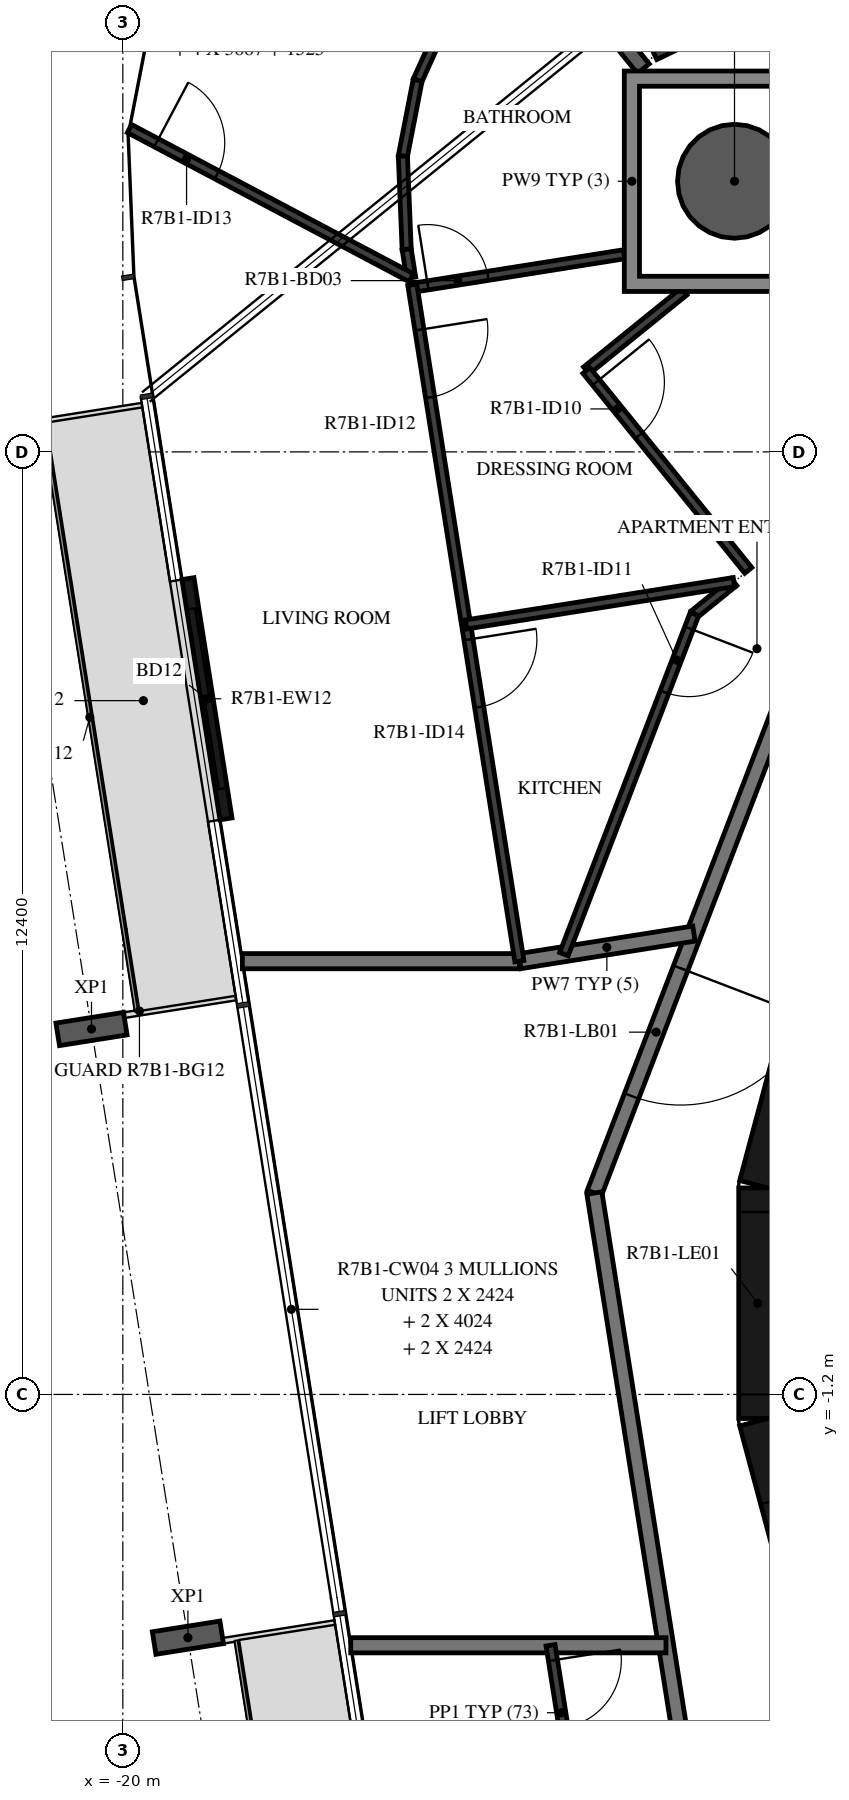
"""IFC4 building model, lengths in metres.
Left out: names, types, materials, properties, quantities, classifications, styles, units other than length and angle.
Written with IfcOpenShell. Run it as: python <this file> out.ifc"""

import sys

from ifc_helpers import new_model, si_unit, direction, frame, frame_2d, origin, origin_2d, place, context, subcontext, project, spatial, polyline, rectangle, hollow_circle, i_section, outline, extrude, element, fill, save


model = new_model("IFC4")
c1 = context("Model", 3, precision=1e-05, world=origin(), true_north=direction((0.0, 1.0)))
c2 = subcontext(c1, "Body", "Model", "MODEL_VIEW")
j1 = project(units=[si_unit("LENGTHUNIT", "METRE"), si_unit("PLANEANGLEUNIT", "RADIAN")], contexts=[c1])
p1 = place(None, origin())
s1 = spatial("IfcSite", under=j1, at=p1, CompositionType="ELEMENT")
p2 = place(p1, origin())
s2 = spatial("IfcBuilding", under=s1, at=p2, CompositionType="ELEMENT")
p3 = place(p2, frame((0.0, 0.0, 273.9)))
s3 = spatial("IfcBuildingStorey", under=s2, at=p3, CompositionType="ELEMENT", Elevation=273.9)
p4 = place(p3, frame((-11.953, 14.76, -0.38), z_axis=(0.0, 0.0, 1.0), x_axis=(1.0, 0.0, 0.0)))
e1 = element("IfcColumn", 1, at=p4, inside=s3, PredefinedType="COLUMN", context=c2, shape_type="SweptSolid", body=[
    extrude(hollow_circle(Radius=0.75, WallThickness=0.035, at=origin_2d()), origin(), (0.0, 0.0, 1.0), 3.5),
])
for number, where, z_axis, x_axis in (
    (2, (-20.412, 3.608, -0.38), (0.0, 0.0, 1.0), (-0.156, 0.988, 0.0)),
    (3, (-19.144, -4.4, -0.38), (0.0, 0.0, 1.0), (-0.156, 0.988, 0.0)),
):
    element("IfcColumn", number, at=place(p3, frame(where, z_axis=z_axis, x_axis=x_axis)), inside=s3, PredefinedType="COLUMN", context=c2, shape_type="SweptSolid", body=[
        extrude(i_section(OverallWidth=0.3, OverallDepth=0.9, WebThickness=0.019, FlangeThickness=0.035, FilletRadius=0.03, at=origin_2d()), origin(), (0.0, 0.0, 1.0), 3.5),
    ])
p5 = place(p3, frame((-19.144, 9.533, 0.0), z_axis=(0.0, 0.0, 1.0), x_axis=(0.156401347891, -0.987693585267, 0.0)))
e4 = element("IfcWall", 4, at=p5, inside=s3, PredefinedType="STANDARD", context=c2, shape_type="SweptSolid", body=[
    extrude(rectangle(XDim=3.2, YDim=0.16, at=frame_2d((1.6, 0.0))), origin(), (0.0, 0.0, 1.0), 3.12),
])
p6 = place(p5, frame((0.4, 0.0, 0.0)))
e5 = element("IfcOpeningElement", 5, at=p6, cuts=e4, PredefinedType="OPENING", context=c2, shape_type="SweptSolid", body=[
    extrude(rectangle(XDim=2.4, YDim=2.4, at=frame_2d((1.2, 1.2))), frame((0.0, 0.09, 0.0), z_axis=(0.0, -1.0, 0.0), x_axis=(1.0, 0.0, 0.0)), (0.0, 0.0, 1.0), 0.18),
])
p7 = place(p3, frame((-10.858, 4.479, 0.0), z_axis=(0.0, 0.0, 1.0), x_axis=(-0.258734743916, -0.965948410781, 0.0)))
e6 = element("IfcWall", 6, at=p7, inside=s3, PredefinedType="SHEAR", context=c2, shape_type="SweptSolid", body=[
    extrude(rectangle(XDim=3.033, YDim=0.5, at=frame_2d((1.516, 0.0))), origin(), (0.0, 0.0, 1.0), 3.12),
])
p8 = place(p3, frame((-11.647, 1.516, 0.0), z_axis=(0.0, 0.0, 1.0), x_axis=(0.0, -1.0, 0.0)))
e7 = element("IfcWall", 7, at=p8, inside=s3, PredefinedType="SHEAR", context=c2, shape_type="SweptSolid", body=[
    extrude(rectangle(XDim=3.033, YDim=0.5, at=frame_2d((1.516, 0.0))), origin(), (0.0, 0.0, 1.0), 3.12),
])
p9 = place(p8, frame((0.316, 0.0, 0.0)))
e8 = element("IfcOpeningElement", 8, at=p9, cuts=e7, PredefinedType="OPENING", context=c2, shape_type="SweptSolid", body=[
    extrude(rectangle(XDim=2.4, YDim=2.1, at=frame_2d((1.2, 1.05))), frame((0.0, 0.26, 0.0), z_axis=(0.0, -1.0, 0.0), x_axis=(1.0, 0.0, 0.0)), (0.0, 0.0, 1.0), 0.52),
])
p10 = place(p3, frame((-11.643, -1.55, 0.0), z_axis=(0.0, 0.0, 1.0), x_axis=(0.258734743916, -0.965948410781, 0.0)))
e9 = element("IfcWall", 9, at=p10, inside=s3, PredefinedType="SHEAR", context=c2, shape_type="SweptSolid", body=[
    extrude(rectangle(XDim=3.033, YDim=0.5, at=frame_2d((1.516, 0.0))), origin(), (0.0, 0.0, 1.0), 3.12),
])
p11 = place(p10, frame((1.066, 0.0, 0.0)))
e10 = element("IfcOpeningElement", 10, at=p11, cuts=e9, PredefinedType="OPENING", context=c2, shape_type="SweptSolid", body=[
    extrude(rectangle(XDim=0.9, YDim=2.1, at=frame_2d((0.45, 1.05))), frame((0.0, 0.26, 0.0), z_axis=(0.0, -1.0, 0.0), x_axis=(1.0, 0.0, 0.0)), (0.0, 0.0, 1.0), 0.52),
])
p12 = place(p3, frame((-11.223, 8.154, 0.0), z_axis=(0.0, 0.0, 1.0), x_axis=(-0.358341090983, -0.93359073609, 0.0)))
e11 = element("IfcWall", 11, at=p12, inside=s3, PredefinedType="STANDARD", context=c2, shape_type="SweptSolid", body=[
    extrude(rectangle(XDim=7.181, YDim=0.2, at=frame_2d((3.59, 0.0))), origin(), (0.0, 0.0, 1.0), 3.12),
])
p13 = place(p12, frame((4.014, 0.0, 0.0)))
e12 = element("IfcOpeningElement", 12, at=p13, cuts=e11, PredefinedType="OPENING", context=c2, shape_type="SweptSolid", body=[
    extrude(rectangle(XDim=1.8, YDim=2.1, at=frame_2d((0.9, 1.05))), frame((0.0, 0.11, 0.0), z_axis=(0.0, -1.0, 0.0), x_axis=(1.0, 0.0, 0.0)), (0.0, 0.0, 1.0), 0.22),
])
p14 = place(p3, frame((-13.797, 1.45, 0.0), z_axis=(0.0, 0.0, 1.0), x_axis=(0.156421704315, -0.987690361611, 0.0)))
e13 = element("IfcWall", 13, at=p14, inside=s3, PredefinedType="STANDARD", context=c2, shape_type="SweptSolid", body=[
    extrude(rectangle(XDim=7.181, YDim=0.2, at=frame_2d((3.591, 0.0))), origin(), (0.0, 0.0, 1.0), 3.12),
])
p15 = place(p3, frame((-12.487, 4.863, 0.0), z_axis=(0.0, 0.0, 1.0), x_axis=(-0.98769031179, -0.156422018898, 0.0)))
e14 = element("IfcWall", 14, at=p15, inside=s3, PredefinedType="STANDARD", context=c2, shape_type="SweptSolid", body=[
    extrude(rectangle(XDim=2.319, YDim=0.2, at=frame_2d((1.16, 0.0))), origin(), (0.0, 0.0, 1.0), 3.12),
])
p16 = place(p3, frame((-14.783, 4.5, 0.0), z_axis=(0.0, 0.0, 1.0), x_axis=(-1.0, 0.0, 0.0)))
e15 = element("IfcWall", 15, at=p16, inside=s3, PredefinedType="STANDARD", context=c2, shape_type="SweptSolid", body=[
    extrude(rectangle(XDim=3.645, YDim=0.2, at=frame_2d((1.822, 0.0))), origin(), (0.0, 0.0, 1.0), 3.12),
])
p17 = place(p3, frame((-17.002, -4.5, 0.0), z_axis=(0.0, 0.0, 1.0), x_axis=(1.0, 0.0, 0.0)))
e16 = element("IfcWall", 16, at=p17, inside=s3, PredefinedType="STANDARD", context=c2, shape_type="SweptSolid", body=[
    extrude(rectangle(XDim=4.148, YDim=0.2, at=frame_2d((2.074, 0.0))), origin(), (0.0, 0.0, 1.0), 3.12),
])
p18 = place(p3, frame((-16.953, 20.936, 0.0), z_axis=(0.0, 0.0, 1.0), x_axis=(0.629347053134, -0.77712437017, 0.0)))
e17 = element("IfcWall", 17, at=p18, inside=s3, PredefinedType="STANDARD", context=c2, shape_type="SweptSolid", body=[
    extrude(rectangle(XDim=6.04, YDim=0.2, at=frame_2d((3.02, 0.0))), origin(), (0.0, 0.0, 1.0), 3.12),
])
p19 = place(p3, frame((-14.132, 22.418, 0.0), z_axis=(0.0, 0.0, 1.0), x_axis=(0.629309172704, -0.77715504576, 0.0)))
e18 = element("IfcWall", 18, at=p19, inside=s3, PredefinedType="PARTITIONING", context=c2, shape_type="SweptSolid", body=[
    extrude(rectangle(XDim=8.736, YDim=0.12, at=frame_2d((4.368, 0.0))), origin(), (0.0, 0.0, 1.0), 3.12),
])
p20 = place(p19, frame((0.4, 0.0, 0.0)))
e19 = element("IfcOpeningElement", 19, at=p20, cuts=e18, PredefinedType="OPENING", context=c2, shape_type="SweptSolid", body=[
    extrude(rectangle(XDim=0.9, YDim=2.1, at=frame_2d((0.45, 1.05))), frame((0.0, 0.07, 0.0), z_axis=(0.0, -1.0, 0.0), x_axis=(1.0, 0.0, 0.0)), (0.0, 0.0, 1.0), 0.14),
])
p21 = place(p3, frame((-10.91, 16.502, 0.0), z_axis=(0.0, 0.0, 1.0), x_axis=(-0.96886520615, 0.247588796823, 0.0)))
e20 = element("IfcWall", 20, at=p21, inside=s3, PredefinedType="PARTITIONING", context=c2, shape_type="SweptSolid", body=[
    extrude(rectangle(XDim=0.807, YDim=0.12, at=frame_2d((0.403, 0.0))), origin(), (0.0, 0.0, 1.0), 3.12),
])
p22 = place(p3, frame((-12.591, 16.613, 0.0), z_axis=(0.0, 0.0, 1.0), x_axis=(-0.901405666701, -0.432975546699, 0.0)))
e21 = element("IfcWall", 21, at=p22, inside=s3, PredefinedType="PARTITIONING", context=c2, shape_type="SweptSolid", body=[
    extrude(rectangle(XDim=0.455, YDim=0.12, at=frame_2d((0.227, 0.0))), origin(), (0.0, 0.0, 1.0), 3.12),
])
p23 = place(p3, frame((-12.616, 13.311, 0.0), z_axis=(0.0, 0.0, 1.0), x_axis=(-0.7771657422, -0.629295963082, 0.0)))
e22 = element("IfcWall", 22, at=p23, inside=s3, PredefinedType="PARTITIONING", context=c2, shape_type="SweptSolid", body=[
    extrude(rectangle(XDim=1.653, YDim=0.12, at=frame_2d((0.826, 0.0))), origin(), (0.0, 0.0, 1.0), 3.12),
])
p24 = place(p3, frame((-13.901, 12.271, 0.0), z_axis=(0.0, 0.0, 1.0), x_axis=(0.62932066967, -0.777145735835, 0.0)))
e23 = element("IfcWall", 23, at=p24, inside=s3, PredefinedType="PARTITIONING", context=c2, shape_type="SweptSolid", body=[
    extrude(rectangle(XDim=3.384, YDim=0.12, at=frame_2d((1.692, 0.0))), origin(), (0.0, 0.0, 1.0), 3.12),
])
p25 = place(p24, frame((0.2, 0.0, 0.0)))
e24 = element("IfcOpeningElement", 24, at=p25, cuts=e23, PredefinedType="OPENING", context=c2, shape_type="SweptSolid", body=[
    extrude(rectangle(XDim=0.9, YDim=2.1, at=frame_2d((0.45, 1.05))), frame((0.0, 0.07, 0.0), z_axis=(0.0, -1.0, 0.0), x_axis=(1.0, 0.0, 0.0)), (0.0, 0.0, 1.0), 0.14),
])
p26 = place(p3, frame((-11.96, 9.487, 0.0), z_axis=(0.0, 0.0, 1.0), x_axis=(-0.777219341678, -0.62922976322, 0.0)))
e25 = element("IfcWall", 25, at=p26, inside=s3, PredefinedType="PARTITIONING", context=c2, shape_type="SweptSolid", body=[
    extrude(rectangle(XDim=0.668, YDim=0.12, at=frame_2d((0.334, 0.0))), origin(), (0.0, 0.0, 1.0), 3.12),
])
p27 = place(p3, frame((-12.479, 9.067, 0.0), z_axis=(0.0, 0.0, 1.0), x_axis=(-0.358402229057, -0.933567267104, 0.0)))
e26 = element("IfcWall", 26, at=p27, inside=s3, PredefinedType="PARTITIONING", context=c2, shape_type="SweptSolid", body=[
    extrude(rectangle(XDim=4.793, YDim=0.12, at=frame_2d((2.397, 0.0))), origin(), (0.0, 0.0, 1.0), 3.12),
])
p28 = place(p27, frame((0.2, 0.0, 0.0)))
e27 = element("IfcOpeningElement", 27, at=p28, cuts=e26, PredefinedType="OPENING", context=c2, shape_type="SweptSolid", body=[
    extrude(rectangle(XDim=0.9, YDim=2.1, at=frame_2d((0.45, 1.05))), frame((0.0, 0.07, 0.0), z_axis=(0.0, -1.0, 0.0), x_axis=(1.0, 0.0, 0.0)), (0.0, 0.0, 1.0), 0.14),
])
p29 = place(p3, frame((-15.703, 17.014, 0.0), z_axis=(0.0, 0.0, 1.0), x_axis=(-0.411973085874, -0.911196014322, 0.0)))
e28 = element("IfcWall", 28, at=p29, inside=s3, PredefinedType="PARTITIONING", context=c2, shape_type="SweptSolid", body=[
    extrude(rectangle(XDim=1.016, YDim=0.12, at=frame_2d((0.508, 0.0))), origin(), (0.0, 0.0, 1.0), 3.12),
])
p30 = place(p3, frame((-16.122, 16.088, 0.0), z_axis=(0.0, 0.0, 1.0), x_axis=(-0.191030445301, -0.981584112019, 0.0)))
e29 = element("IfcWall", 29, at=p30, inside=s3, PredefinedType="PARTITIONING", context=c2, shape_type="SweptSolid", body=[
    extrude(rectangle(XDim=1.016, YDim=0.12, at=frame_2d((0.508, 0.0))), origin(), (0.0, 0.0, 1.0), 3.12),
])
p31 = place(p3, frame((-16.316, 15.091, 0.0), z_axis=(0.0, 0.0, 1.0), x_axis=(0.040786423131, -0.999167887639, 0.0)))
e30 = element("IfcWall", 30, at=p31, inside=s3, PredefinedType="PARTITIONING", context=c2, shape_type="SweptSolid", body=[
    extrude(rectangle(XDim=1.227, YDim=0.12, at=frame_2d((0.614, 0.0))), origin(), (0.0, 0.0, 1.0), 3.12),
])
p32 = place(p3, frame((-16.266, 13.865, 0.0), z_axis=(0.0, 0.0, 1.0), x_axis=(0.156757556272, -0.987637113798, 0.0)))
e31 = element("IfcWall", 31, at=p32, inside=s3, PredefinedType="PARTITIONING", context=c2, shape_type="SweptSolid", body=[
    extrude(rectangle(XDim=0.378, YDim=0.12, at=frame_2d((0.189, 0.0))), origin(), (0.0, 0.0, 1.0), 3.12),
])
p33 = place(p3, frame((-16.186, 13.359, 0.0), z_axis=(0.0, 0.0, 1.0), x_axis=(0.987680631298, 0.156483131865, 0.0)))
e32 = element("IfcWall", 32, at=p33, inside=s3, PredefinedType="PARTITIONING", context=c2, shape_type="SweptSolid", body=[
    extrude(rectangle(XDim=2.818, YDim=0.12, at=frame_2d((1.409, 0.0))), origin(), (0.0, 0.0, 1.0), 3.12),
])
p34 = place(p33, frame((0.2, 0.0, 0.0)))
e33 = element("IfcOpeningElement", 33, at=p34, cuts=e32, PredefinedType="OPENING", context=c2, shape_type="SweptSolid", body=[
    extrude(rectangle(XDim=0.8, YDim=2.1, at=frame_2d((0.4, 1.05))), frame((0.0, 0.07, 0.0), z_axis=(0.0, -1.0, 0.0), x_axis=(1.0, 0.0, 0.0)), (0.0, 0.0, 1.0), 0.14),
])
p35 = place(p3, frame((-19.913, 15.454, 0.0), z_axis=(0.0, 0.0, 1.0), x_axis=(0.883751094582, -0.467957266024, 0.0)))
e34 = element("IfcWall", 34, at=p35, inside=s3, PredefinedType="PARTITIONING", context=c2, shape_type="SweptSolid", body=[
    extrude(rectangle(XDim=4.194, YDim=0.12, at=frame_2d((2.097, 0.0))), origin(), (0.0, 0.0, 1.0), 3.12),
])
p36 = place(p35, frame((0.4, 0.0, 0.0)))
e35 = element("IfcOpeningElement", 35, at=p36, cuts=e34, PredefinedType="OPENING", context=c2, shape_type="SweptSolid", body=[
    extrude(rectangle(XDim=0.9, YDim=2.1, at=frame_2d((0.45, 1.05))), frame((0.0, 0.07, 0.0), z_axis=(0.0, -1.0, 0.0), x_axis=(1.0, 0.0, 0.0)), (0.0, 0.0, 1.0), 0.14),
])
p37 = place(p3, frame((-16.192, 13.399, 0.0), z_axis=(0.0, 0.0, 1.0), x_axis=(0.156405047803, -0.987692999379, 0.0)))
e36 = element("IfcWall", 36, at=p37, inside=s3, PredefinedType="PARTITIONING", context=c2, shape_type="SweptSolid", body=[
    extrude(rectangle(XDim=9.01, YDim=0.12, at=frame_2d((4.505, 0.0))), origin(), (0.0, 0.0, 1.0), 3.12),
])
p38 = place(p37, frame((0.6, 0.0, 0.0)))
e37 = element("IfcOpeningElement", 37, at=p38, cuts=e36, PredefinedType="OPENING", context=c2, shape_type="SweptSolid", body=[
    extrude(rectangle(XDim=0.9, YDim=2.1, at=frame_2d((0.45, 1.05))), frame((0.0, 0.07, 0.0), z_axis=(0.0, -1.0, 0.0), x_axis=(1.0, 0.0, 0.0)), (0.0, 0.0, 1.0), 0.14),
])
p39 = place(p37, frame((4.725, 0.0, 0.0)))
e38 = element("IfcOpeningElement", 38, at=p39, cuts=e36, PredefinedType="OPENING", context=c2, shape_type="SweptSolid", body=[
    extrude(rectangle(XDim=0.9, YDim=2.1, at=frame_2d((0.45, 1.05))), frame((0.0, 0.07, 0.0), z_axis=(0.0, -1.0, 0.0), x_axis=(1.0, 0.0, 0.0)), (0.0, 0.0, 1.0), 0.14),
])
p40 = place(p3, frame((-15.484, 8.929, 0.0), z_axis=(0.0, 0.0, 1.0), x_axis=(0.987689619983, 0.156426387092, 0.0)))
e39 = element("IfcWall", 39, at=p40, inside=s3, PredefinedType="PARTITIONING", context=c2, shape_type="SweptSolid", body=[
    extrude(rectangle(XDim=3.568, YDim=0.12, at=frame_2d((1.784, 0.0))), origin(), (0.0, 0.0, 1.0), 3.12),
])
p41 = place(p3, frame((-14.373, -4.5, 0.0), z_axis=(0.0, 0.0, 1.0), x_axis=(0.156437152886, -0.987687914878, 0.0)))
e40 = element("IfcWall", 40, at=p41, inside=s3, PredefinedType="PARTITIONING", context=c2, shape_type="SweptSolid", body=[
    extrude(rectangle(XDim=1.796, YDim=0.12, at=frame_2d((0.898, 0.0))), origin(), (0.0, 0.0, 1.0), 3.12),
])
p42 = place(p41, frame((0.2, 0.0, 0.0)))
e41 = element("IfcOpeningElement", 41, at=p42, cuts=e40, PredefinedType="OPENING", context=c2, shape_type="SweptSolid", body=[
    extrude(rectangle(XDim=0.9, YDim=2.1, at=frame_2d((0.45, 1.05))), frame((0.0, 0.07, 0.0), z_axis=(0.0, -1.0, 0.0), x_axis=(1.0, 0.0, 0.0)), (0.0, 0.0, 1.0), 0.14),
])
p43 = place(p3, origin())
e42 = element("IfcWall", 42, at=p43, inside=s3, PredefinedType="STANDARD", context=c2, shape_type="SweptSolid", body=[
    extrude(outline(polyline([(-10.503, 16.21), (-10.503, 13.311), (-13.403, 13.311), (-13.403, 16.21), (-10.503, 16.21)]), holes=[polyline([(-13.203, 13.51), (-10.703, 13.51), (-10.703, 16.01), (-13.203, 16.01), (-13.203, 13.51)])]), origin(), (0.0, 0.0, 1.0), 3.12),
])
p44 = place(p6, origin())
e43 = element("IfcDoor", 43, at=p44, inside=s3, OperationType="DOUBLE_DOOR_SLIDING", PredefinedType="DOOR", context=c2, shape_type="SweptSolid", body=[
    extrude(rectangle(XDim=2.4, YDim=2.4, at=frame_2d((1.2, 1.2))), frame((0.0, 0.025, 0.0), z_axis=(0.0, -1.0, 0.0), x_axis=(1.0, 0.0, 0.0)), (0.0, 0.0, 1.0), 0.05),
])
fill(e5, e43)
p45 = place(p9, origin())
e44 = element("IfcDoor", 44, at=p45, inside=s3, OperationType="DOUBLE_DOOR_SINGLE_SWING", PredefinedType="DOOR", context=c2, shape_type="SweptSolid", body=[
    extrude(rectangle(XDim=2.4, YDim=2.1, at=frame_2d((1.2, 1.05))), frame((0.0, 0.025, 0.0), z_axis=(0.0, -1.0, 0.0), x_axis=(1.0, 0.0, 0.0)), (0.0, 0.0, 1.0), 0.05),
])
fill(e8, e44)
p46 = place(p25, origin())
e45 = element("IfcDoor", 45, at=p46, inside=s3, OperationType="SINGLE_SWING_LEFT", PredefinedType="DOOR", context=c2, shape_type="SweptSolid", body=[
    extrude(rectangle(XDim=0.9, YDim=2.1, at=frame_2d((0.45, 1.05))), frame((0.0, 0.025, 0.0), z_axis=(0.0, -1.0, 0.0), x_axis=(1.0, 0.0, 0.0)), (0.0, 0.0, 1.0), 0.05),
])
fill(e24, e45)
p47 = place(p28, origin())
e46 = element("IfcDoor", 46, at=p47, inside=s3, OperationType="SINGLE_SWING_LEFT", PredefinedType="DOOR", context=c2, shape_type="SweptSolid", body=[
    extrude(rectangle(XDim=0.9, YDim=2.1, at=frame_2d((0.45, 1.05))), frame((0.0, 0.025, 0.0), z_axis=(0.0, -1.0, 0.0), x_axis=(1.0, 0.0, 0.0)), (0.0, 0.0, 1.0), 0.05),
])
fill(e27, e46)
p48 = place(p34, origin())
e47 = element("IfcDoor", 47, at=p48, inside=s3, OperationType="SINGLE_SWING_LEFT", PredefinedType="DOOR", context=c2, shape_type="SweptSolid", body=[
    extrude(rectangle(XDim=0.8, YDim=2.1, at=frame_2d((0.4, 1.05))), frame((0.0, 0.025, 0.0), z_axis=(0.0, -1.0, 0.0), x_axis=(1.0, 0.0, 0.0)), (0.0, 0.0, 1.0), 0.05),
])
fill(e33, e47)
p49 = place(p38, origin())
e48 = element("IfcDoor", 48, at=p49, inside=s3, OperationType="SINGLE_SWING_LEFT", PredefinedType="DOOR", context=c2, shape_type="SweptSolid", body=[
    extrude(rectangle(XDim=0.9, YDim=2.1, at=frame_2d((0.45, 1.05))), frame((0.0, 0.025, 0.0), z_axis=(0.0, -1.0, 0.0), x_axis=(1.0, 0.0, 0.0)), (0.0, 0.0, 1.0), 0.05),
])
fill(e37, e48)
p50 = place(p36, origin())
e49 = element("IfcDoor", 49, at=p50, inside=s3, OperationType="SINGLE_SWING_LEFT", PredefinedType="DOOR", context=c2, shape_type="SweptSolid", body=[
    extrude(rectangle(XDim=0.9, YDim=2.1, at=frame_2d((0.45, 1.05))), frame((0.0, 0.025, 0.0), z_axis=(0.0, -1.0, 0.0), x_axis=(1.0, 0.0, 0.0)), (0.0, 0.0, 1.0), 0.05),
])
fill(e35, e49)
p51 = place(p39, origin())
e50 = element("IfcDoor", 50, at=p51, inside=s3, OperationType="SINGLE_SWING_RIGHT", PredefinedType="DOOR", context=c2, shape_type="SweptSolid", body=[
    extrude(rectangle(XDim=0.9, YDim=2.1, at=frame_2d((0.45, 1.05))), frame((0.0, 0.025, 0.0), z_axis=(0.0, -1.0, 0.0), x_axis=(1.0, 0.0, 0.0)), (0.0, 0.0, 1.0), 0.05),
])
fill(e38, e50)
p52 = place(p42, origin())
e51 = element("IfcDoor", 51, at=p52, inside=s3, OperationType="SINGLE_SWING_RIGHT", PredefinedType="DOOR", context=c2, shape_type="SweptSolid", body=[
    extrude(rectangle(XDim=0.9, YDim=2.1, at=frame_2d((0.45, 1.05))), frame((0.0, 0.025, 0.0), z_axis=(0.0, -1.0, 0.0), x_axis=(1.0, 0.0, 0.0)), (0.0, 0.0, 1.0), 0.05),
])
fill(e41, e51)
p53 = place(p13, origin())
e52 = element("IfcDoor", 52, at=p53, inside=s3, OperationType="DOUBLE_DOOR_SINGLE_SWING", PredefinedType="DOOR", context=c2, shape_type="SweptSolid", body=[
    extrude(rectangle(XDim=1.8, YDim=2.1, at=frame_2d((0.9, 1.05))), frame((0.0, 0.025, 0.0), z_axis=(0.0, -1.0, 0.0), x_axis=(1.0, 0.0, 0.0)), (0.0, 0.0, 1.0), 0.05),
])
fill(e12, e52)
save(model, sys.argv[1])
